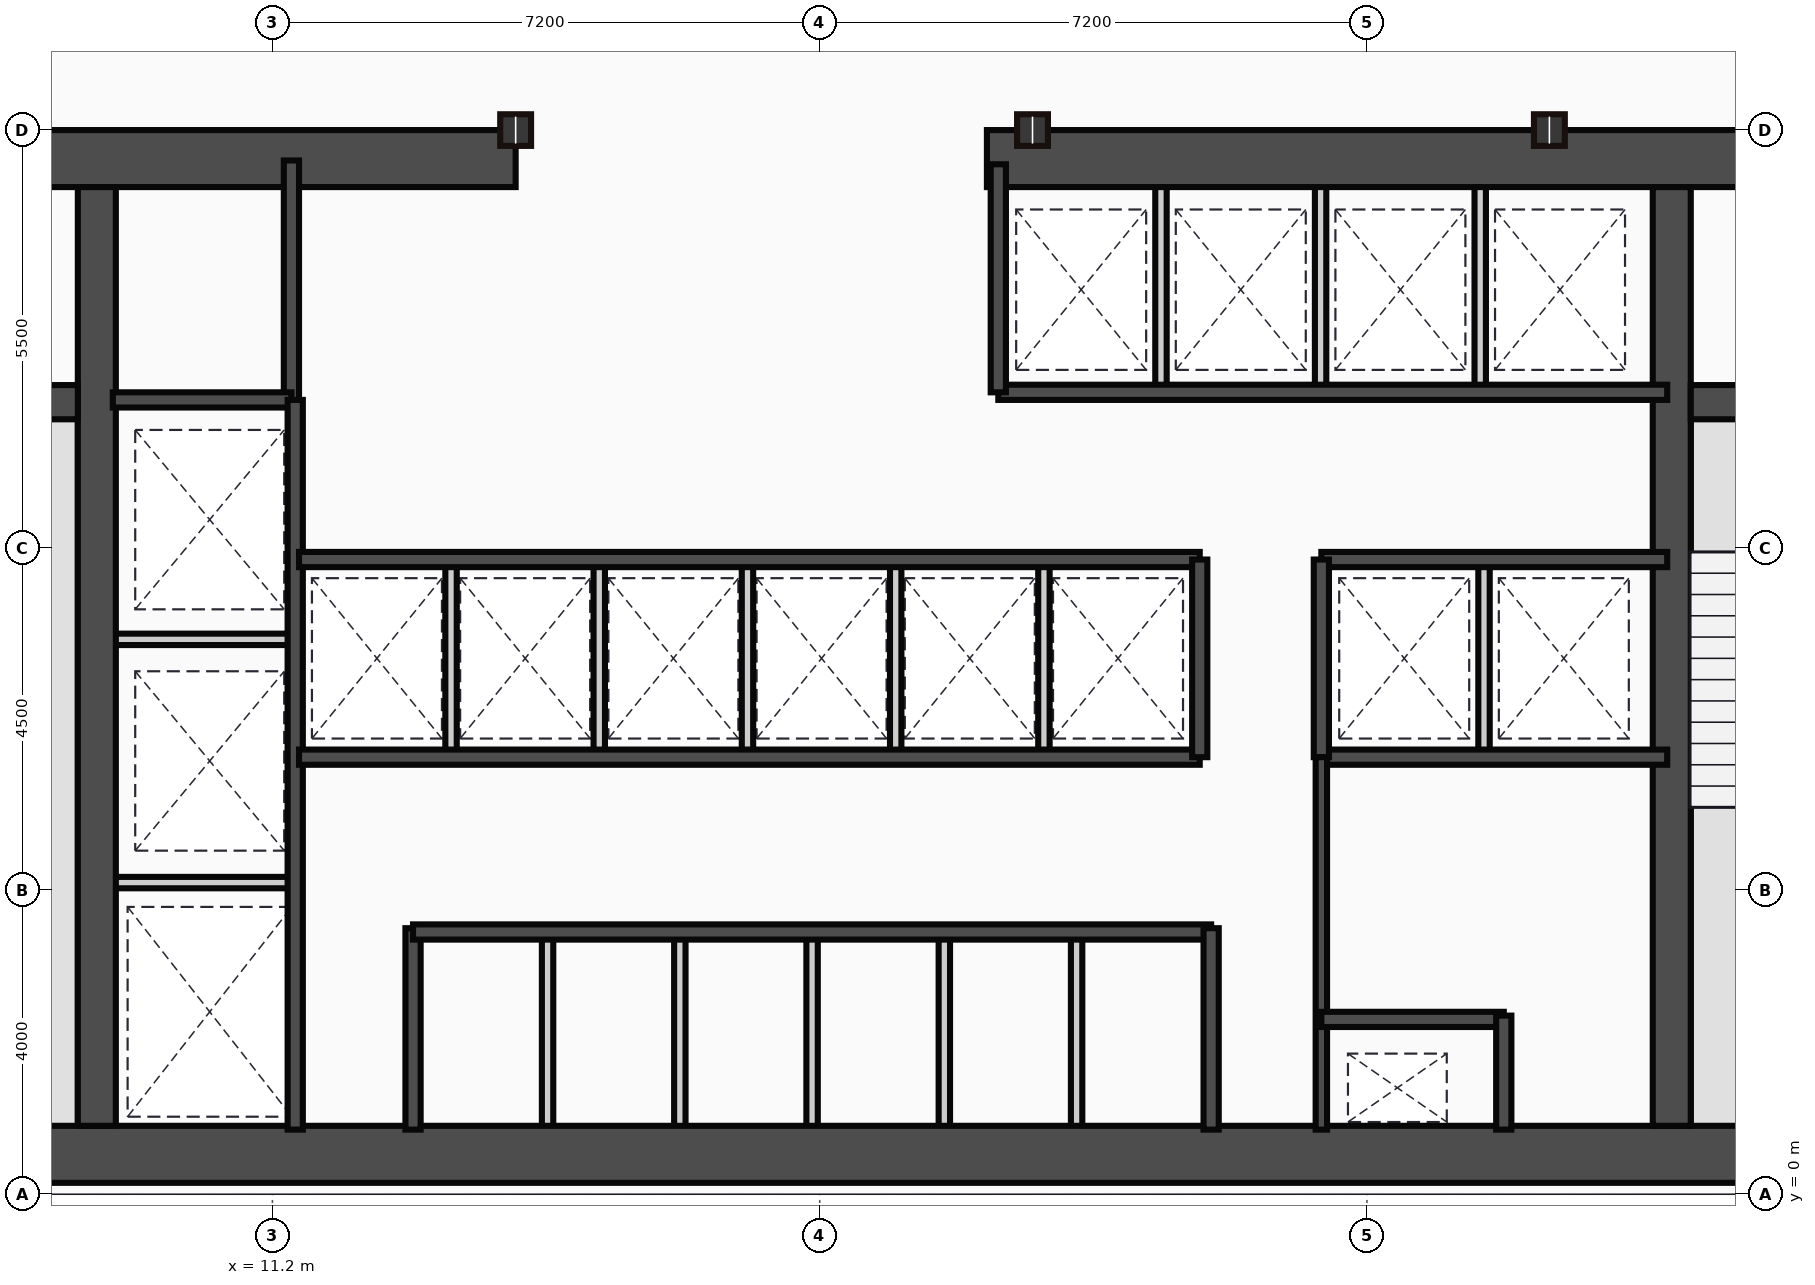
"""IFC4 building model, lengths in metres.
Left out: names, types, materials, properties, quantities, classifications, styles, units other than length and angle.
Written with IfcOpenShell. Run it as: python <this file> out.ifc"""

import sys

from ifc_helpers import new_model, si_unit, direction, frame, frame_2d, origin, origin_2d, place, context, subcontext, project, spatial, rectangle, i_section, extrude, source, transform, mapped, element, fill, save


model = new_model("IFC4")
c1 = context("Model", 3, precision=1e-05, world=origin(), true_north=direction((0.0, 1.0)))
c2 = subcontext(c1, "Body", "Model", "MODEL_VIEW")
j1 = project(units=[si_unit("LENGTHUNIT", "METRE"), si_unit("PLANEANGLEUNIT", "RADIAN")], contexts=[c1])
p1 = place(None, origin())
s1 = spatial("IfcSite", under=j1, at=p1, CompositionType="ELEMENT")
p2 = place(p1, origin())
s2 = spatial("IfcBuilding", under=s1, at=p2, CompositionType="ELEMENT")
p3 = place(p2, frame((0.0, 0.0, 84.15)))
s3 = spatial("IfcBuildingStorey", under=s2, at=p3, CompositionType="ELEMENT", Elevation=84.15)
m1 = source(origin(), c2, "Body", "SweptSolid", [
    extrude(rectangle(XDim=29.5, YDim=0.75, at=frame_2d((14.75, 0.0))), origin(), (0.0, 0.0, 1.0), 4.5),
])
p4 = place(p3, frame((4.5, 0.525, 0.0), z_axis=(0.0, 0.0, 1.0), x_axis=(1.0, 0.0, 0.0)))
e1 = element("IfcWall", 1, at=p4, inside=s3, PredefinedType="SHEAR", context=c2, shape_type="MappedRepresentation", body=[
    mapped(m1, transform((0.0, 0.0, 0.0))),
])
m2 = source(origin(), c2, "Body", "SweptSolid", [
    extrude(rectangle(XDim=9.1, YDim=0.75, at=frame_2d((4.55, 0.0))), origin(), (0.0, 0.0, 1.0), 4.5),
])
p5 = place(p3, frame((5.3, 13.625, 0.0), z_axis=(0.0, 0.0, 1.0), x_axis=(1.0, 0.0, 0.0)))
e2 = element("IfcWall", 2, at=p5, inside=s3, PredefinedType="SHEAR", context=c2, shape_type="MappedRepresentation", body=[
    mapped(m2, transform((0.0, 0.0, 0.0))),
])
p6 = place(p5, frame((4.1, 0.0, 0.0)))
e3 = element("IfcOpeningElement", 3, at=p6, cuts=e2, PredefinedType="OPENING", context=c2, shape_type="SweptSolid", body=[
    extrude(rectangle(XDim=1.1, YDim=2.15, at=frame_2d((0.55, 1.075))), frame((0.0, 0.385, 0.0), z_axis=(0.0, -1.0, 0.0), x_axis=(1.0, 0.0, 0.0)), (0.0, 0.0, 1.0), 0.77),
])
m3 = source(origin(), c2, "Body", "SweptSolid", [
    extrude(rectangle(XDim=12.6, YDim=0.75, at=frame_2d((6.3, 0.0))), origin(), (0.0, 0.0, 1.0), 4.5),
])
p7 = place(p3, frame((20.6, 13.625, 0.0), z_axis=(0.0, 0.0, 1.0), x_axis=(1.0, 0.0, 0.0)))
e4 = element("IfcWall", 4, at=p7, inside=s3, PredefinedType="SHEAR", context=c2, shape_type="MappedRepresentation", body=[
    mapped(m3, transform((0.0, 0.0, 0.0))),
])
p8 = place(p7, frame((9.25, 0.0, 0.0)))
e5 = element("IfcOpeningElement", 5, at=p8, cuts=e4, PredefinedType="OPENING", context=c2, shape_type="SweptSolid", body=[
    extrude(rectangle(XDim=1.1, YDim=2.15, at=frame_2d((0.55, 1.075))), frame((0.0, 0.385, 0.0), z_axis=(0.0, -1.0, 0.0), x_axis=(1.0, 0.0, 0.0)), (0.0, 0.0, 1.0), 0.77),
])
m4 = source(origin(), c2, "Body", "SweptSolid", [
    extrude(rectangle(XDim=12.35, YDim=0.5, at=frame_2d((6.175, 0.0))), origin(), (0.0, 0.0, 1.0), 4.5),
])
for number, where, z_axis, x_axis in (
    (6, (8.89, 0.9, 0.0), (0.0, 0.0, 1.0), (0.0, 1.0, 0.0)),
    (7, (29.61, 0.9, 0.0), (0.0, 0.0, 1.0), (0.0, 1.0, 0.0)),
):
    element("IfcWall", number, at=place(p3, frame(where, z_axis=z_axis, x_axis=x_axis)), inside=s3, PredefinedType="SHEAR", context=c2, shape_type="MappedRepresentation", body=[
        mapped(m4, transform((0.0, 0.0, 0.0))),
    ])
m5 = source(origin(), c2, "Body", "SweptSolid", [
    extrude(rectangle(XDim=3.39, YDim=0.45, at=frame_2d((1.695, 0.0))), origin(), (0.0, 0.0, 1.0), 4.5),
])
p9 = place(p3, frame((5.25, 10.42, 0.0), z_axis=(0.0, 0.0, 1.0), x_axis=(1.0, 0.0, 0.0)))
e8 = element("IfcWall", 8, at=p9, inside=s3, PredefinedType="SHEAR", context=c2, shape_type="MappedRepresentation", body=[
    mapped(m5, transform((0.0, 0.0, 0.0))),
])
p10 = place(p9, frame((1.05, 0.0, 0.0)))
e9 = element("IfcOpeningElement", 9, at=p10, cuts=e8, PredefinedType="OPENING", context=c2, shape_type="SweptSolid", body=[
    extrude(rectangle(XDim=1.1, YDim=2.15, at=frame_2d((0.55, 1.075))), frame((0.0, 0.235, 0.0), z_axis=(0.0, -1.0, 0.0), x_axis=(1.0, 0.0, 0.0)), (0.0, 0.0, 1.0), 0.47),
])
p11 = place(p3, frame((29.86, 10.42, 0.0), z_axis=(0.0, 0.0, 1.0), x_axis=(1.0, 0.0, 0.0)))
e10 = element("IfcWall", 10, at=p11, inside=s3, PredefinedType="SHEAR", context=c2, shape_type="MappedRepresentation", body=[
    mapped(m5, transform((0.0, 0.0, 0.0))),
])
p12 = place(p11, frame((1.1, 0.0, 0.0)))
e11 = element("IfcOpeningElement", 11, at=p12, cuts=e10, PredefinedType="OPENING", context=c2, shape_type="SweptSolid", body=[
    extrude(rectangle(XDim=1.1, YDim=2.15, at=frame_2d((0.55, 1.075))), frame((0.0, 0.235, 0.0), z_axis=(0.0, -1.0, 0.0), x_axis=(1.0, 0.0, 0.0)), (0.0, 0.0, 1.0), 0.47),
])
m6 = source(origin(), c2, "Body", "SweptSolid", [
    extrude(i_section(OverallWidth=0.406, OverallDepth=0.416, WebThickness=0.03, FlangeThickness=0.048, at=origin_2d()), origin(), (0.0, 0.0, 1.0), 4.5),
])
for number, where, z_axis, x_axis in (
    (12, (14.4, 14.0, 0.0), (0.0, 0.0, 1.0), (1.0, 0.0, 0.0)),
    (13, (21.2, 14.0, 0.0), (0.0, 0.0, 1.0), (1.0, 0.0, 0.0)),
    (14, (28.0, 14.0, 0.0), (0.0, 0.0, 1.0), (1.0, 0.0, 0.0)),
):
    element("IfcColumn", number, at=place(p3, frame(where, z_axis=z_axis, x_axis=x_axis)), inside=s3, PredefinedType="COLUMN", context=c2, shape_type="MappedRepresentation", body=[
        mapped(m6, transform((0.0, 0.0, 0.0))),
    ])
m7 = source(origin(), c2, "Body", "SweptSolid", [
    extrude(rectangle(XDim=3.18, YDim=0.2, at=frame_2d((1.59, 0.0))), origin(), (0.0, 0.0, 1.0), 4.25),
])
p13 = place(p3, frame((11.45, 10.42, 0.0), z_axis=(0.0, 0.0, 1.0), x_axis=(0.0, 1.0, 0.0)))
e15 = element("IfcWall", 15, at=p13, inside=s3, PredefinedType="PARTITIONING", context=c2, shape_type="MappedRepresentation", body=[
    mapped(m7, transform((0.0, 0.0, 0.0))),
])
m8 = source(origin(), c2, "Body", "SweptSolid", [
    extrude(rectangle(XDim=2.35, YDim=0.2, at=frame_2d((1.175, 0.0))), origin(), (0.0, 0.0, 1.0), 4.25),
])
p14 = place(p3, frame((9.1, 10.45, 0.0), z_axis=(0.0, 0.0, 1.0), x_axis=(1.0, 0.0, 0.0)))
e16 = element("IfcWall", 16, at=p14, inside=s3, PredefinedType="PARTITIONING", context=c2, shape_type="MappedRepresentation", body=[
    mapped(m8, transform((0.0, 0.0, 0.0))),
])
p15 = place(p14, frame((0.55, 0.0, 0.0)))
e17 = element("IfcOpeningElement", 17, at=p15, cuts=e16, PredefinedType="OPENING", context=c2, shape_type="SweptSolid", body=[
    extrude(rectangle(XDim=1.1, YDim=2.15, at=frame_2d((0.55, 1.075))), frame((0.0, 0.11, 0.0), z_axis=(0.0, -1.0, 0.0), x_axis=(1.0, 0.0, 0.0)), (0.0, 0.0, 1.0), 0.22),
])
m9 = source(origin(), c2, "Body", "SweptSolid", [
    extrude(rectangle(XDim=9.6, YDim=0.2, at=frame_2d((4.8, 0.0))), origin(), (0.0, 0.0, 1.0), 4.25),
])
p16 = place(p3, frame((11.5, 0.85, 0.0), z_axis=(0.0, 0.0, 1.0), x_axis=(0.0, 1.0, 0.0)))
e18 = element("IfcWall", 18, at=p16, inside=s3, PredefinedType="PARTITIONING", context=c2, shape_type="MappedRepresentation", body=[
    mapped(m9, transform((0.0, 0.0, 0.0))),
])
p17 = place(p16, frame((4.2, 0.0, 0.0)))
e19 = element("IfcOpeningElement", 19, at=p17, cuts=e18, PredefinedType="OPENING", context=c2, shape_type="SweptSolid", body=[
    extrude(rectangle(XDim=1.1, YDim=2.15, at=frame_2d((0.55, 1.075))), frame((0.0, 0.11, 0.0), z_axis=(0.0, -1.0, 0.0), x_axis=(1.0, 0.0, 0.0)), (0.0, 0.0, 1.0), 0.22),
])
p18 = place(p16, frame((0.9, 0.0, 0.0)))
e20 = element("IfcOpeningElement", 20, at=p18, cuts=e18, PredefinedType="OPENING", context=c2, shape_type="SweptSolid", body=[
    extrude(rectangle(XDim=1.2, YDim=2.15, at=frame_2d((0.6, 1.075))), frame((0.0, 0.11, 0.0), z_axis=(0.0, -1.0, 0.0), x_axis=(1.0, 0.0, 0.0)), (0.0, 0.0, 1.0), 0.22),
])
m10 = source(origin(), c2, "Body", "SweptSolid", [
    extrude(rectangle(XDim=2.4, YDim=0.15, at=frame_2d((1.2, 0.0))), origin(), (0.0, 0.0, 1.0), 4.25),
])
for number, where, z_axis, x_axis in (
    (21, (9.1, 4.1, 0.0), (0.0, 0.0, 1.0), (1.0, 0.0, 0.0)),
    (22, (9.1, 7.3, 0.0), (0.0, 0.0, 1.0), (1.0, 0.0, 0.0)),
):
    element("IfcWall", number, at=place(p3, frame(where, z_axis=z_axis, x_axis=x_axis)), inside=s3, PredefinedType="PARTITIONING", context=c2, shape_type="MappedRepresentation", body=[
        mapped(m10, transform((0.0, 0.0, 0.0))),
    ])
m11 = source(origin(), c2, "Body", "SweptSolid", [
    extrude(rectangle(XDim=2.65, YDim=0.2, at=frame_2d((1.325, 0.0))), origin(), (0.0, 0.0, 1.0), 4.25),
])
p19 = place(p3, frame((13.05, 0.85, 0.0), z_axis=(0.0, 0.0, 1.0), x_axis=(0.0, 1.0, 0.0)))
e23 = element("IfcWall", 23, at=p19, inside=s3, PredefinedType="PARTITIONING", context=c2, shape_type="MappedRepresentation", body=[
    mapped(m11, transform((0.0, 0.0, 0.0))),
])
m12 = source(origin(), c2, "Body", "SweptSolid", [
    extrude(rectangle(XDim=10.5, YDim=0.2, at=frame_2d((5.25, 0.0))), origin(), (0.0, 0.0, 1.0), 4.25),
])
p20 = place(p3, frame((13.05, 3.45, 0.0), z_axis=(0.0, 0.0, 1.0), x_axis=(1.0, 0.0, 0.0)))
e24 = element("IfcWall", 24, at=p20, inside=s3, PredefinedType="PARTITIONING", context=c2, shape_type="MappedRepresentation", body=[
    mapped(m12, transform((0.0, 0.0, 0.0))),
])
p21 = place(p3, frame((23.55, 0.85, 0.0), z_axis=(0.0, 0.0, 1.0), x_axis=(0.0, 1.0, 0.0)))
e25 = element("IfcWall", 25, at=p21, inside=s3, PredefinedType="PARTITIONING", context=c2, shape_type="MappedRepresentation", body=[
    mapped(m11, transform((0.0, 0.0, 0.0))),
])
m13 = source(origin(), c2, "Body", "SweptSolid", [
    extrude(rectangle(XDim=2.6, YDim=0.15, at=frame_2d((1.3, 0.0))), origin(), (0.0, 0.0, 1.0), 4.25),
])
for number, where, z_axis, x_axis in (
    (26, (14.82, 0.85, 0.0), (0.0, 0.0, 1.0), (0.0, 1.0, 0.0)),
    (27, (16.56, 0.85, 0.0), (0.0, 0.0, 1.0), (0.0, 1.0, 0.0)),
    (28, (18.3, 0.85, 0.0), (0.0, 0.0, 1.0), (0.0, 1.0, 0.0)),
    (29, (20.04, 0.85, 0.0), (0.0, 0.0, 1.0), (0.0, 1.0, 0.0)),
    (30, (21.78, 0.85, 0.0), (0.0, 0.0, 1.0), (0.0, 1.0, 0.0)),
):
    element("IfcWall", number, at=place(p3, frame(where, z_axis=z_axis, x_axis=x_axis)), inside=s3, PredefinedType="PARTITIONING", context=c2, shape_type="MappedRepresentation", body=[
        mapped(m13, transform((0.0, 0.0, 0.0))),
    ])
m14 = source(origin(), c2, "Body", "SweptSolid", [
    extrude(rectangle(XDim=11.85, YDim=0.2, at=frame_2d((5.925, 0.0))), origin(), (0.0, 0.0, 1.0), 4.25),
])
for number, where, z_axis, x_axis in (
    (31, (11.55, 5.75, 0.0), (0.0, 0.0, 1.0), (1.0, 0.0, 0.0)),
    (32, (11.55, 8.35, 0.0), (0.0, 0.0, 1.0), (1.0, 0.0, 0.0)),
):
    element("IfcWall", number, at=place(p3, frame(where, z_axis=z_axis, x_axis=x_axis)), inside=s3, PredefinedType="PARTITIONING", context=c2, shape_type="MappedRepresentation", body=[
        mapped(m14, transform((0.0, 0.0, 0.0))),
    ])
m15 = source(origin(), c2, "Body", "SweptSolid", [
    extrude(rectangle(XDim=2.6, YDim=0.2, at=frame_2d((1.3, 0.0))), origin(), (0.0, 0.0, 1.0), 4.25),
])
p22 = place(p3, frame((23.4, 5.75, 0.0), z_axis=(0.0, 0.0, 1.0), x_axis=(0.0, 1.0, 0.0)))
e33 = element("IfcWall", 33, at=p22, inside=s3, PredefinedType="PARTITIONING", context=c2, shape_type="MappedRepresentation", body=[
    mapped(m15, transform((0.0, 0.0, 0.0))),
])
m16 = source(origin(), c2, "Body", "SweptSolid", [
    extrude(rectangle(XDim=2.5, YDim=0.15, at=frame_2d((1.25, 0.0))), origin(), (0.0, 0.0, 1.0), 4.25),
])
for number, where, z_axis, x_axis in (
    (34, (13.55, 5.8, 0.0), (0.0, 0.0, 1.0), (0.0, 1.0, 0.0)),
    (35, (15.5, 5.8, 0.0), (0.0, 0.0, 1.0), (0.0, 1.0, 0.0)),
    (36, (17.45, 5.8, 0.0), (0.0, 0.0, 1.0), (0.0, 1.0, 0.0)),
    (37, (19.4, 5.8, 0.0), (0.0, 0.0, 1.0), (0.0, 1.0, 0.0)),
    (38, (21.35, 5.8, 0.0), (0.0, 0.0, 1.0), (0.0, 1.0, 0.0)),
):
    element("IfcWall", number, at=place(p3, frame(where, z_axis=z_axis, x_axis=x_axis)), inside=s3, PredefinedType="PARTITIONING", context=c2, shape_type="MappedRepresentation", body=[
        mapped(m16, transform((0.0, 0.0, 0.0))),
    ])
m17 = source(origin(), c2, "Body", "SweptSolid", [
    extrude(rectangle(XDim=8.8, YDim=0.2, at=frame_2d((4.4, 0.0))), origin(), (0.0, 0.0, 1.0), 4.25),
])
p23 = place(p3, frame((20.75, 10.55, 0.0), z_axis=(0.0, 0.0, 1.0), x_axis=(1.0, 0.0, 0.0)))
e39 = element("IfcWall", 39, at=p23, inside=s3, PredefinedType="PARTITIONING", context=c2, shape_type="MappedRepresentation", body=[
    mapped(m17, transform((0.0, 0.0, 0.0))),
])
m18 = source(origin(), c2, "Body", "SweptSolid", [
    extrude(rectangle(XDim=3.0, YDim=0.2, at=frame_2d((1.5, 0.0))), origin(), (0.0, 0.0, 1.0), 4.25),
])
p24 = place(p3, frame((20.75, 10.55, 0.0), z_axis=(0.0, 0.0, 1.0), x_axis=(0.0, 1.0, 0.0)))
e40 = element("IfcWall", 40, at=p24, inside=s3, PredefinedType="PARTITIONING", context=c2, shape_type="MappedRepresentation", body=[
    mapped(m18, transform((0.0, 0.0, 0.0))),
])
m19 = source(origin(), c2, "Body", "SweptSolid", [
    extrude(rectangle(XDim=2.85, YDim=0.15, at=frame_2d((1.425, 0.0))), origin(), (0.0, 0.0, 1.0), 4.25),
])
for number, where, z_axis, x_axis in (
    (41, (22.89, 10.6, 0.0), (0.0, 0.0, 1.0), (0.0, 1.0, 0.0)),
    (42, (24.99, 10.6, 0.0), (0.0, 0.0, 1.0), (0.0, 1.0, 0.0)),
    (43, (27.09, 10.6, 0.0), (0.0, 0.0, 1.0), (0.0, 1.0, 0.0)),
):
    element("IfcWall", number, at=place(p3, frame(where, z_axis=z_axis, x_axis=x_axis)), inside=s3, PredefinedType="PARTITIONING", context=c2, shape_type="MappedRepresentation", body=[
        mapped(m19, transform((0.0, 0.0, 0.0))),
    ])
m20 = source(origin(), c2, "Body", "SweptSolid", [
    extrude(rectangle(XDim=4.55, YDim=0.2, at=frame_2d((2.275, 0.0))), origin(), (0.0, 0.0, 1.0), 4.25),
])
for number, where, z_axis, x_axis in (
    (44, (25.0, 8.35, 0.0), (0.0, 0.0, 1.0), (1.0, 0.0, 0.0)),
    (45, (25.0, 5.75, 0.0), (0.0, 0.0, 1.0), (1.0, 0.0, 0.0)),
):
    element("IfcWall", number, at=place(p3, frame(where, z_axis=z_axis, x_axis=x_axis)), inside=s3, PredefinedType="PARTITIONING", context=c2, shape_type="MappedRepresentation", body=[
        mapped(m20, transform((0.0, 0.0, 0.0))),
    ])
p25 = place(p3, frame((25.0, 5.75, 0.0), z_axis=(0.0, 0.0, 1.0), x_axis=(0.0, 1.0, 0.0)))
e46 = element("IfcWall", 46, at=p25, inside=s3, PredefinedType="PARTITIONING", context=c2, shape_type="MappedRepresentation", body=[
    mapped(m15, transform((0.0, 0.0, 0.0))),
])
p26 = place(p3, frame((27.14, 5.8, 0.0), z_axis=(0.0, 0.0, 1.0), x_axis=(0.0, 1.0, 0.0)))
e47 = element("IfcWall", 47, at=p26, inside=s3, PredefinedType="PARTITIONING", context=c2, shape_type="MappedRepresentation", body=[
    mapped(m16, transform((0.0, 0.0, 0.0))),
])
m21 = source(origin(), c2, "Body", "SweptSolid", [
    extrude(rectangle(XDim=4.9, YDim=0.15, at=frame_2d((2.45, 0.0))), origin(), (0.0, 0.0, 1.0), 4.25),
])
p27 = place(p3, frame((25.0, 0.85, 0.0), z_axis=(0.0, 0.0, 1.0), x_axis=(0.0, 1.0, 0.0)))
e48 = element("IfcWall", 48, at=p27, inside=s3, PredefinedType="PARTITIONING", context=c2, shape_type="MappedRepresentation", body=[
    mapped(m21, transform((0.0, 0.0, 0.0))),
])
p28 = place(p27, frame((2.4, 0.0, 0.0)))
e49 = element("IfcOpeningElement", 49, at=p28, cuts=e48, PredefinedType="OPENING", context=c2, shape_type="SweptSolid", body=[
    extrude(rectangle(XDim=0.95, YDim=2.15, at=frame_2d((0.475, 1.075))), frame((0.0, 0.085, 0.0), z_axis=(0.0, -1.0, 0.0), x_axis=(1.0, 0.0, 0.0)), (0.0, 0.0, 1.0), 0.17),
])
m22 = source(origin(), c2, "Body", "SweptSolid", [
    extrude(rectangle(XDim=2.4, YDim=0.2, at=frame_2d((1.2, 0.0))), origin(), (0.0, 0.0, 1.0), 4.25),
])
p29 = place(p3, frame((25.0, 2.3, 0.0), z_axis=(0.0, 0.0, 1.0), x_axis=(1.0, 0.0, 0.0)))
e50 = element("IfcWall", 50, at=p29, inside=s3, PredefinedType="PARTITIONING", context=c2, shape_type="MappedRepresentation", body=[
    mapped(m22, transform((0.0, 0.0, 0.0))),
])
m23 = source(origin(), c2, "Body", "SweptSolid", [
    extrude(rectangle(XDim=1.5, YDim=0.2, at=frame_2d((0.75, 0.0))), origin(), (0.0, 0.0, 1.0), 4.25),
])
p30 = place(p3, frame((27.4, 0.85, 0.0), z_axis=(0.0, 0.0, 1.0), x_axis=(0.0, 1.0, 0.0)))
e51 = element("IfcWall", 51, at=p30, inside=s3, PredefinedType="PARTITIONING", context=c2, shape_type="MappedRepresentation", body=[
    mapped(m23, transform((0.0, 0.0, 0.0))),
])
m24 = source(origin(), c2, "Body", "SweptSolid", [
    extrude(rectangle(XDim=1.1, YDim=2.15, at=frame_2d((0.55, 1.075))), frame((0.0, 0.025, 0.0), z_axis=(0.0, -1.0, 0.0), x_axis=(1.0, 0.0, 0.0)), (0.0, 0.0, 1.0), 0.05),
])
p31 = place(p6, origin())
e52 = element("IfcDoor", 52, at=p31, inside=s3, OperationType="SINGLE_SWING_RIGHT", PredefinedType="DOOR", context=c2, shape_type="MappedRepresentation", body=[
    mapped(m24, transform((0.0, 0.0, 0.0))),
])
fill(e3, e52)
p32 = place(p8, origin())
e53 = element("IfcDoor", 53, at=p32, inside=s3, OperationType="SINGLE_SWING_LEFT", PredefinedType="DOOR", context=c2, shape_type="MappedRepresentation", body=[
    mapped(m24, transform((0.0, 0.0, 0.0))),
])
fill(e5, e53)
p33 = place(p15, origin())
e54 = element("IfcDoor", 54, at=p33, inside=s3, OperationType="SLIDING_TO_LEFT", PredefinedType="DOOR", context=c2, shape_type="MappedRepresentation", body=[
    mapped(m24, transform((0.0, 0.0, 0.0))),
])
fill(e17, e54)
p34 = place(p17, frame((1.1, 0.0, 0.0), z_axis=(0.0, 0.0, 1.0), x_axis=(-1.0, 0.0, 0.0)))
e55 = element("IfcDoor", 55, at=p34, inside=s3, OperationType="SLIDING_TO_LEFT", PredefinedType="DOOR", context=c2, shape_type="MappedRepresentation", body=[
    mapped(m24, transform((0.0, 0.0, 0.0))),
])
fill(e19, e55)
m25 = source(origin(), c2, "Body", "SweptSolid", [
    extrude(rectangle(XDim=1.2, YDim=2.15, at=frame_2d((0.6, 1.075))), frame((0.0, 0.025, 0.0), z_axis=(0.0, -1.0, 0.0), x_axis=(1.0, 0.0, 0.0)), (0.0, 0.0, 1.0), 0.05),
])
p35 = place(p18, frame((1.2, 0.0, 0.0), z_axis=(0.0, 0.0, 1.0), x_axis=(-1.0, 0.0, 0.0)))
e56 = element("IfcDoor", 56, at=p35, inside=s3, OperationType="SLIDING_TO_LEFT", PredefinedType="DOOR", context=c2, shape_type="MappedRepresentation", body=[
    mapped(m25, transform((0.0, 0.0, 0.0))),
])
fill(e20, e56)
m26 = source(origin(), c2, "Body", "SweptSolid", [
    extrude(rectangle(XDim=0.95, YDim=2.15, at=frame_2d((0.475, 1.075))), frame((0.0, 0.025, 0.0), z_axis=(0.0, -1.0, 0.0), x_axis=(1.0, 0.0, 0.0)), (0.0, 0.0, 1.0), 0.05),
])
p36 = place(p28, origin())
e57 = element("IfcDoor", 57, at=p36, inside=s3, OperationType="SINGLE_SWING_LEFT", PredefinedType="DOOR", context=c2, shape_type="MappedRepresentation", body=[
    mapped(m26, transform((0.0, 0.0, 0.0))),
])
fill(e49, e57)
save(model, sys.argv[1])
